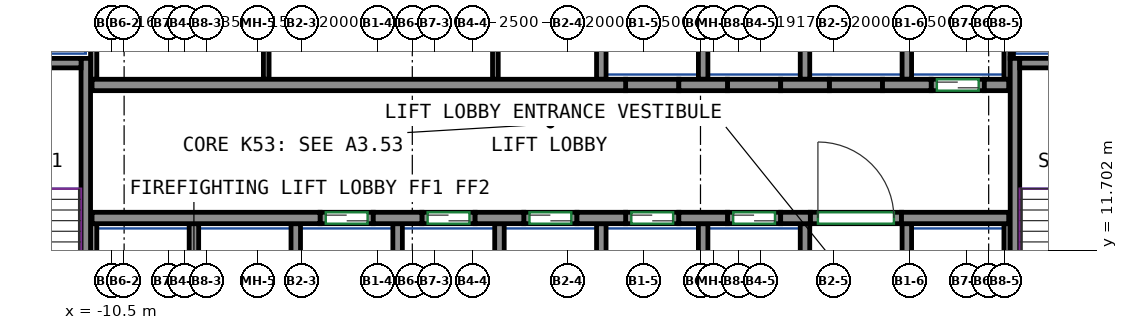
"""IFC4 building model, lengths in metres.
Left out: names, types, materials, properties, quantities, classifications, styles, units other than length and angle.
Written with IfcOpenShell. Run it as: python <this file> out.ifc"""

import sys

from ifc_helpers import new_model, si_unit, direction, frame, frame_2d, origin, place, context, subcontext, project, spatial, rectangle, extrude, source, transform, mapped, element, fill, save


model = new_model("IFC4")
c1 = context("Model", 3, precision=1e-05, world=origin(), true_north=direction((0.0, 1.0)))
c2 = subcontext(c1, "Body", "Model", "MODEL_VIEW")
j1 = project(units=[si_unit("LENGTHUNIT", "METRE"), si_unit("PLANEANGLEUNIT", "RADIAN")], contexts=[c1])
p1 = place(None, origin())
s1 = spatial("IfcSite", under=j1, at=p1, CompositionType="ELEMENT")
p2 = place(p1, origin())
s2 = spatial("IfcBuilding", under=s1, at=p2, CompositionType="ELEMENT")
p3 = place(p2, frame((0.0, 0.0, 213.5)))
s3 = spatial("IfcBuildingStorey", under=s2, at=p3, CompositionType="ELEMENT", Elevation=213.5)
m1 = source(origin(), c2, "Body", "SweptSolid", [
    extrude(rectangle(XDim=7.75, YDim=0.25, at=frame_2d((3.875, 0.0))), origin(), (0.0, 0.0, 1.0), 3.12),
])
p4 = place(p3, frame((-11.175, 9.0, 0.0), z_axis=(0.0, 0.0, 1.0), x_axis=(0.0, 1.0, 0.0)))
e1 = element("IfcWall", 1, at=p4, inside=s3, PredefinedType="SHEAR", context=c2, shape_type="MappedRepresentation", body=[
    mapped(m1, transform((0.0, 0.0, 0.0))),
])
m2 = source(origin(), c2, "Body", "SweptSolid", [
    extrude(rectangle(XDim=3.7, YDim=0.25, at=frame_2d((1.85, 0.0))), origin(), (0.0, 0.0, 1.0), 3.12),
])
p5 = place(p3, frame((-15.0, 16.625, 0.0), z_axis=(0.0, 0.0, 1.0), x_axis=(1.0, 0.0, 0.0)))
e2 = element("IfcWall", 2, at=p5, inside=s3, PredefinedType="SHEAR", context=c2, shape_type="MappedRepresentation", body=[
    mapped(m2, transform((0.0, 0.0, 0.0))),
])
p6 = place(p3, frame((13.275, 9.0, 0.0), z_axis=(0.0, 0.0, 1.0), x_axis=(0.0, 1.0, 0.0)))
e3 = element("IfcWall", 3, at=p6, inside=s3, PredefinedType="SHEAR", context=c2, shape_type="MappedRepresentation", body=[
    mapped(m1, transform((0.0, 0.0, 0.0))),
])
m3 = source(origin(), c2, "Body", "SweptSolid", [
    extrude(rectangle(XDim=3.7, YDim=0.25, at=frame_2d((1.85, 0.0))), origin(), (0.0, 0.0, 1.0), 3.12),
])
p7 = place(p3, frame((13.4, 16.625, 0.0), z_axis=(0.0, 0.0, 1.0), x_axis=(1.0, 0.0, 0.0)))
e4 = element("IfcWall", 4, at=p7, inside=s3, PredefinedType="SHEAR", context=c2, shape_type="MappedRepresentation", body=[
    mapped(m3, transform((0.0, 0.0, 0.0))),
])
m4 = source(origin(), c2, "Body", "SweptSolid", [
    extrude(rectangle(XDim=6.0, YDim=0.3, at=frame_2d((3.0, 0.0))), origin(), (0.0, 0.0, 1.0), 3.12),
])
p8 = place(p3, frame((-11.01, 12.55, 0.0), z_axis=(0.0, 0.0, 1.0), x_axis=(1.0, 0.0, 0.0)))
e5 = element("IfcWall", 5, at=p8, inside=s3, PredefinedType="SHEAR", context=c2, shape_type="MappedRepresentation", body=[
    mapped(m4, transform((0.0, 0.0, 0.0))),
])
m5 = source(origin(), c2, "Body", "SweptSolid", [
    extrude(rectangle(XDim=1.28, YDim=0.3, at=frame_2d((0.64, 0.0))), origin(), (0.0, 0.0, 1.0), 3.12),
])
for number, where, z_axis, x_axis in (
    (6, (-3.61, 12.55, 0.0), (0.0, 0.0, 1.0), (1.0, 0.0, 0.0)),
    (7, (-0.93, 12.55, 0.0), (0.0, 0.0, 1.0), (1.0, 0.0, 0.0)),
    (8, (1.75, 12.55, 0.0), (0.0, 0.0, 1.0), (1.0, 0.0, 0.0)),
    (9, (4.43, 12.55, 0.0), (0.0, 0.0, 1.0), (1.0, 0.0, 0.0)),
):
    element("IfcWall", number, at=place(p3, frame(where, z_axis=z_axis, x_axis=x_axis)), inside=s3, PredefinedType="SHEAR", context=c2, shape_type="MappedRepresentation", body=[
        mapped(m5, transform((0.0, 0.0, 0.0))),
    ])
m6 = source(origin(), c2, "Body", "SweptSolid", [
    extrude(rectangle(XDim=0.78, YDim=0.3, at=frame_2d((0.39, 0.0))), origin(), (0.0, 0.0, 1.0), 3.12),
])
p9 = place(p3, frame((7.11, 12.55, 0.0), z_axis=(0.0, 0.0, 1.0), x_axis=(1.0, 0.0, 0.0)))
e10 = element("IfcWall", 10, at=p9, inside=s3, PredefinedType="SHEAR", context=c2, shape_type="MappedRepresentation", body=[
    mapped(m6, transform((0.0, 0.0, 0.0))),
])
m7 = source(origin(), c2, "Body", "SweptSolid", [
    extrude(rectangle(XDim=2.82, YDim=0.3, at=frame_2d((1.41, 0.0))), origin(), (0.0, 0.0, 1.0), 3.12),
])
p10 = place(p3, frame((10.29, 12.55, 0.0), z_axis=(0.0, 0.0, 1.0), x_axis=(1.0, 0.0, 0.0)))
e11 = element("IfcWall", 11, at=p10, inside=s3, PredefinedType="SHEAR", context=c2, shape_type="MappedRepresentation", body=[
    mapped(m7, transform((0.0, 0.0, 0.0))),
])
m8 = source(origin(), c2, "Body", "SweptSolid", [
    extrude(rectangle(XDim=14.04, YDim=0.3, at=frame_2d((7.02, 0.0))), origin(), (0.0, 0.0, 1.0), 3.12),
])
p11 = place(p3, frame((-11.01, 16.05, 0.0), z_axis=(0.0, 0.0, 1.0), x_axis=(1.0, 0.0, 0.0)))
e12 = element("IfcWall", 12, at=p11, inside=s3, PredefinedType="SHEAR", context=c2, shape_type="MappedRepresentation", body=[
    mapped(m8, transform((0.0, 0.0, 0.0))),
])
p12 = place(p3, frame((4.43, 16.05, 0.0), z_axis=(0.0, 0.0, 1.0), x_axis=(1.0, 0.0, 0.0)))
e13 = element("IfcWall", 13, at=p12, inside=s3, PredefinedType="SHEAR", context=c2, shape_type="MappedRepresentation", body=[
    mapped(m5, transform((0.0, 0.0, 0.0))),
])
m9 = source(origin(), c2, "Body", "SweptSolid", [
    extrude(rectangle(XDim=1.28, YDim=0.3, at=frame_2d((0.64, 0.0))), origin(), (0.0, 0.0, 1.0), 3.12),
])
p13 = place(p3, frame((7.11, 16.05, 0.0), z_axis=(0.0, 0.0, 1.0), x_axis=(1.0, 0.0, 0.0)))
e14 = element("IfcWall", 14, at=p13, inside=s3, PredefinedType="SHEAR", context=c2, shape_type="MappedRepresentation", body=[
    mapped(m9, transform((0.0, 0.0, 0.0))),
])
p14 = place(p3, frame((9.79, 16.05, 0.0), z_axis=(0.0, 0.0, 1.0), x_axis=(1.0, 0.0, 0.0)))
e15 = element("IfcWall", 15, at=p14, inside=s3, PredefinedType="SHEAR", context=c2, shape_type="MappedRepresentation", body=[
    mapped(m5, transform((0.0, 0.0, 0.0))),
])
m10 = source(origin(), c2, "Body", "SweptSolid", [
    extrude(rectangle(XDim=0.64, YDim=0.3, at=frame_2d((0.32, 0.0))), origin(), (0.0, 0.0, 1.0), 3.12),
])
p15 = place(p3, frame((12.47, 16.05, 0.0), z_axis=(0.0, 0.0, 1.0), x_axis=(1.0, 0.0, 0.0)))
e16 = element("IfcWall", 16, at=p15, inside=s3, PredefinedType="SHEAR", context=c2, shape_type="MappedRepresentation", body=[
    mapped(m10, transform((0.0, 0.0, 0.0))),
])
m11 = source(origin(), c2, "Body", "SweptSolid", [
    extrude(rectangle(XDim=1.4, YDim=0.3, at=frame_2d((0.7, 0.0))), origin(), (0.0, 0.0, 1.0), 3.12),
])
p16 = place(p3, frame((-5.01, 12.55, 0.0), z_axis=(0.0, 0.0, 1.0), x_axis=(1.0, 0.0, 0.0)))
e17 = element("IfcWall", 17, at=p16, inside=s3, PredefinedType="PARTITIONING", context=c2, shape_type="MappedRepresentation", body=[
    mapped(m11, transform((0.0, 0.0, 0.0))),
])
p17 = place(p16, frame((0.15, 0.0, 0.0)))
e18 = element("IfcOpeningElement", 18, at=p17, cuts=e17, PredefinedType="OPENING", context=c2, shape_type="SweptSolid", body=[
    extrude(rectangle(XDim=1.1, YDim=2.1, at=frame_2d((0.55, 1.05))), frame((0.0, 0.16, 0.0), z_axis=(0.0, -1.0, 0.0), x_axis=(1.0, 0.0, 0.0)), (0.0, 0.0, 1.0), 0.32),
])
m12 = source(origin(), c2, "Body", "SweptSolid", [
    extrude(rectangle(XDim=1.4, YDim=0.3, at=frame_2d((0.7, 0.0))), origin(), (0.0, 0.0, 1.0), 3.12),
])
p18 = place(p3, frame((-2.33, 12.55, 0.0), z_axis=(0.0, 0.0, 1.0), x_axis=(1.0, 0.0, 0.0)))
e19 = element("IfcWall", 19, at=p18, inside=s3, PredefinedType="PARTITIONING", context=c2, shape_type="MappedRepresentation", body=[
    mapped(m12, transform((0.0, 0.0, 0.0))),
])
p19 = place(p18, frame((0.15, 0.0, 0.0)))
e20 = element("IfcOpeningElement", 20, at=p19, cuts=e19, PredefinedType="OPENING", context=c2, shape_type="SweptSolid", body=[
    extrude(rectangle(XDim=1.1, YDim=2.1, at=frame_2d((0.55, 1.05))), frame((0.0, 0.16, 0.0), z_axis=(0.0, -1.0, 0.0), x_axis=(1.0, 0.0, 0.0)), (0.0, 0.0, 1.0), 0.32),
])
p20 = place(p3, frame((0.35, 12.55, 0.0), z_axis=(0.0, 0.0, 1.0), x_axis=(1.0, 0.0, 0.0)))
e21 = element("IfcWall", 21, at=p20, inside=s3, PredefinedType="PARTITIONING", context=c2, shape_type="MappedRepresentation", body=[
    mapped(m11, transform((0.0, 0.0, 0.0))),
])
p21 = place(p20, frame((0.15, 0.0, 0.0)))
e22 = element("IfcOpeningElement", 22, at=p21, cuts=e21, PredefinedType="OPENING", context=c2, shape_type="SweptSolid", body=[
    extrude(rectangle(XDim=1.1, YDim=2.1, at=frame_2d((0.55, 1.05))), frame((0.0, 0.16, 0.0), z_axis=(0.0, -1.0, 0.0), x_axis=(1.0, 0.0, 0.0)), (0.0, 0.0, 1.0), 0.32),
])
p22 = place(p3, frame((3.03, 12.55, 0.0), z_axis=(0.0, 0.0, 1.0), x_axis=(1.0, 0.0, 0.0)))
e23 = element("IfcWall", 23, at=p22, inside=s3, PredefinedType="PARTITIONING", context=c2, shape_type="MappedRepresentation", body=[
    mapped(m11, transform((0.0, 0.0, 0.0))),
])
p23 = place(p22, frame((0.15, 0.0, 0.0)))
e24 = element("IfcOpeningElement", 24, at=p23, cuts=e23, PredefinedType="OPENING", context=c2, shape_type="SweptSolid", body=[
    extrude(rectangle(XDim=1.1, YDim=2.1, at=frame_2d((0.55, 1.05))), frame((0.0, 0.16, 0.0), z_axis=(0.0, -1.0, 0.0), x_axis=(1.0, 0.0, 0.0)), (0.0, 0.0, 1.0), 0.32),
])
p24 = place(p3, frame((5.71, 12.55, 0.0), z_axis=(0.0, 0.0, 1.0), x_axis=(1.0, 0.0, 0.0)))
e25 = element("IfcWall", 25, at=p24, inside=s3, PredefinedType="PARTITIONING", context=c2, shape_type="MappedRepresentation", body=[
    mapped(m12, transform((0.0, 0.0, 0.0))),
])
p25 = place(p24, frame((0.15, 0.0, 0.0)))
e26 = element("IfcOpeningElement", 26, at=p25, cuts=e25, PredefinedType="OPENING", context=c2, shape_type="SweptSolid", body=[
    extrude(rectangle(XDim=1.1, YDim=2.1, at=frame_2d((0.55, 1.05))), frame((0.0, 0.16, 0.0), z_axis=(0.0, -1.0, 0.0), x_axis=(1.0, 0.0, 0.0)), (0.0, 0.0, 1.0), 0.32),
])
p26 = place(p3, frame((11.07, 16.05, 0.0), z_axis=(0.0, 0.0, 1.0), x_axis=(1.0, 0.0, 0.0)))
e27 = element("IfcWall", 27, at=p26, inside=s3, PredefinedType="PARTITIONING", context=c2, shape_type="MappedRepresentation", body=[
    mapped(m11, transform((0.0, 0.0, 0.0))),
])
p27 = place(p26, frame((0.15, 0.0, 0.0)))
e28 = element("IfcOpeningElement", 28, at=p27, cuts=e27, PredefinedType="OPENING", context=c2, shape_type="SweptSolid", body=[
    extrude(rectangle(XDim=1.1, YDim=2.1, at=frame_2d((0.55, 1.05))), frame((0.0, 0.16, 0.0), z_axis=(0.0, -1.0, 0.0), x_axis=(1.0, 0.0, 0.0)), (0.0, 0.0, 1.0), 0.32),
])
m13 = source(origin(), c2, "Body", "SweptSolid", [
    extrude(rectangle(XDim=2.4, YDim=0.3, at=frame_2d((1.2, 0.0))), origin(), (0.0, 0.0, 1.0), 3.12),
])
p28 = place(p3, frame((7.89, 12.55, 0.0), z_axis=(0.0, 0.0, 1.0), x_axis=(1.0, 0.0, 0.0)))
e29 = element("IfcWall", 29, at=p28, inside=s3, PredefinedType="PARTITIONING", context=c2, shape_type="MappedRepresentation", body=[
    mapped(m13, transform((0.0, 0.0, 0.0))),
])
p29 = place(p28, frame((0.2, 0.0, 0.0)))
e30 = element("IfcOpeningElement", 30, at=p29, cuts=e29, PredefinedType="OPENING", context=c2, shape_type="SweptSolid", body=[
    extrude(rectangle(XDim=2.0, YDim=2.1, at=frame_2d((1.0, 1.05))), frame((0.0, 0.16, 0.0), z_axis=(0.0, -1.0, 0.0), x_axis=(1.0, 0.0, 0.0)), (0.0, 0.0, 1.0), 0.32),
])
p30 = place(p3, frame((3.03, 16.05, 0.0), z_axis=(0.0, 0.0, 1.0), x_axis=(1.0, 0.0, 0.0)))
e31 = element("IfcWall", 31, at=p30, inside=s3, PredefinedType="PARTITIONING", context=c2, shape_type="MappedRepresentation", body=[
    mapped(m11, transform((0.0, 0.0, 0.0))),
])
for number, where, z_axis, x_axis in (
    (32, (5.71, 16.05, 0.0), (0.0, 0.0, 1.0), (1.0, 0.0, 0.0)),
    (33, (8.39, 16.05, 0.0), (0.0, 0.0, 1.0), (1.0, 0.0, 0.0)),
):
    element("IfcWall", number, at=place(p3, frame(where, z_axis=z_axis, x_axis=x_axis)), inside=s3, PredefinedType="PARTITIONING", context=c2, shape_type="MappedRepresentation", body=[
        mapped(m12, transform((0.0, 0.0, 0.0))),
    ])
m14 = source(origin(), c2, "Body", "SweptSolid", [
    extrude(rectangle(XDim=3.275, YDim=0.165, at=frame_2d((1.638, 0.0))), origin(), (0.0, 0.0, 1.0), 3.12),
])
p31 = place(p3, frame((13.067, 16.2, 0.0), z_axis=(0.0, 0.0, 1.0), x_axis=(0.0, 1.0, 0.0)))
e34 = element("IfcWall", 34, at=p31, inside=s3, PredefinedType="PARTITIONING", context=c2, shape_type="MappedRepresentation", body=[
    mapped(m14, transform((0.0, 0.0, 0.0))),
])
m15 = source(origin(), c2, "Body", "SweptSolid", [
    extrude(rectangle(XDim=4.8, YDim=0.165, at=frame_2d((2.4, 0.0))), origin(), (0.0, 0.0, 1.0), 3.12),
])
p32 = place(p3, frame((-10.968, 16.2, 0.0), z_axis=(0.0, 0.0, 1.0), x_axis=(0.0, 1.0, 0.0)))
e35 = element("IfcWall", 35, at=p32, inside=s3, PredefinedType="PARTITIONING", context=c2, shape_type="MappedRepresentation", body=[
    mapped(m15, transform((0.0, 0.0, 0.0))),
])
m16 = source(origin(), c2, "Body", "SweptSolid", [
    extrude(rectangle(XDim=3.275, YDim=0.25, at=frame_2d((1.638, 0.0))), origin(), (0.0, 0.0, 1.0), 3.12),
])
p33 = place(p3, frame((10.43, 16.2, 0.0), z_axis=(0.0, 0.0, 1.0), x_axis=(0.0, 1.0, 0.0)))
e36 = element("IfcWall", 36, at=p33, inside=s3, PredefinedType="PARTITIONING", context=c2, shape_type="MappedRepresentation", body=[
    mapped(m16, transform((0.0, 0.0, 0.0))),
])
m17 = source(origin(), c2, "Body", "SweptSolid", [
    extrude(rectangle(XDim=2.725, YDim=0.085, at=frame_2d((1.363, 0.0))), origin(), (0.0, 0.0, 1.0), 3.12),
])
p34 = place(p3, frame((13.192, 16.75, 0.0), z_axis=(0.0, 0.0, 1.0), x_axis=(0.0, 1.0, 0.0)))
e37 = element("IfcWall", 37, at=p34, inside=s3, PredefinedType="PARTITIONING", context=c2, shape_type="MappedRepresentation", body=[
    mapped(m17, transform((0.0, 0.0, 0.0))),
])
for number, where, z_axis, x_axis in (
    (38, (2.39, 16.2, 0.0), (0.0, 0.0, 1.0), (0.0, 1.0, 0.0)),
    (39, (5.07, 16.2, 0.0), (0.0, 0.0, 1.0), (0.0, 1.0, 0.0)),
    (40, (7.75, 16.2, 0.0), (0.0, 0.0, 1.0), (0.0, 1.0, 0.0)),
):
    element("IfcWall", number, at=place(p3, frame(where, z_axis=z_axis, x_axis=x_axis)), inside=s3, PredefinedType="PARTITIONING", context=c2, shape_type="MappedRepresentation", body=[
        mapped(m16, transform((0.0, 0.0, 0.0))),
    ])
m18 = source(origin(), c2, "Body", "SweptSolid", [
    extrude(rectangle(XDim=3.4, YDim=0.25, at=frame_2d((1.7, 0.0))), origin(), (0.0, 0.0, 1.0), 3.12),
])
p35 = place(p3, frame((10.43, 9.0, 0.0), z_axis=(0.0, 0.0, 1.0), x_axis=(0.0, 1.0, 0.0)))
e41 = element("IfcWall", 41, at=p35, inside=s3, PredefinedType="PARTITIONING", context=c2, shape_type="MappedRepresentation", body=[
    mapped(m18, transform((0.0, 0.0, 0.0))),
])
m19 = source(origin(), c2, "Body", "SweptSolid", [
    extrude(rectangle(XDim=3.4, YDim=0.165, at=frame_2d((1.7, 0.0))), origin(), (0.0, 0.0, 1.0), 3.12),
])
p36 = place(p3, frame((13.067, 9.0, 0.0), z_axis=(0.0, 0.0, 1.0), x_axis=(0.0, 1.0, 0.0)))
e42 = element("IfcWall", 42, at=p36, inside=s3, PredefinedType="PARTITIONING", context=c2, shape_type="MappedRepresentation", body=[
    mapped(m19, transform((0.0, 0.0, 0.0))),
])
for number, where, z_axis, x_axis in (
    (43, (2.39, 9.0, 0.0), (0.0, 0.0, 1.0), (0.0, 1.0, 0.0)),
    (44, (5.07, 9.0, 0.0), (0.0, 0.0, 1.0), (0.0, 1.0, 0.0)),
    (45, (7.75, 9.0, 0.0), (0.0, 0.0, 1.0), (0.0, 1.0, 0.0)),
    (46, (-0.29, 9.0, 0.0), (0.0, 0.0, 1.0), (0.0, 1.0, 0.0)),
):
    element("IfcWall", number, at=place(p3, frame(where, z_axis=z_axis, x_axis=x_axis)), inside=s3, PredefinedType="PARTITIONING", context=c2, shape_type="MappedRepresentation", body=[
        mapped(m18, transform((0.0, 0.0, 0.0))),
    ])
p37 = place(p3, frame((-10.968, 9.0, 0.0), z_axis=(0.0, 0.0, 1.0), x_axis=(0.0, 1.0, 0.0)))
e47 = element("IfcWall", 47, at=p37, inside=s3, PredefinedType="PARTITIONING", context=c2, shape_type="MappedRepresentation", body=[
    mapped(m19, transform((0.0, 0.0, 0.0))),
])
for number, where, z_axis, x_axis in (
    (48, (-2.97, 9.0, 0.0), (0.0, 0.0, 1.0), (0.0, 1.0, 0.0)),
    (49, (-5.65, 9.0, 0.0), (0.0, 0.0, 1.0), (0.0, 1.0, 0.0)),
    (50, (-8.33, 9.0, 0.0), (0.0, 0.0, 1.0), (0.0, 1.0, 0.0)),
):
    element("IfcWall", number, at=place(p3, frame(where, z_axis=z_axis, x_axis=x_axis)), inside=s3, PredefinedType="PARTITIONING", context=c2, shape_type="MappedRepresentation", body=[
        mapped(m18, transform((0.0, 0.0, 0.0))),
    ])
m20 = source(origin(), c2, "Body", "SweptSolid", [
    extrude(rectangle(XDim=4.8, YDim=0.15, at=frame_2d((2.4, 0.0))), origin(), (0.0, 0.0, 1.0), 3.12),
])
for number, where, z_axis, x_axis in (
    (51, (-6.427, 16.2, 0.0), (0.0, 0.0, 1.0), (0.0, 1.0, 0.0)),
    (52, (-0.397, 16.2, 0.0), (0.0, 0.0, 1.0), (0.0, 1.0, 0.0)),
):
    element("IfcWall", number, at=place(p3, frame(where, z_axis=z_axis, x_axis=x_axis)), inside=s3, PredefinedType="PARTITIONING", context=c2, shape_type="MappedRepresentation", body=[
        mapped(m20, transform((0.0, 0.0, 0.0))),
    ])
p38 = place(p29, origin())
e53 = element("IfcDoor", 53, at=p38, inside=s3, OperationType="DOUBLE_DOOR_SINGLE_SWING", PredefinedType="DOOR", context=c2, shape_type="SweptSolid", body=[
    extrude(rectangle(XDim=2.0, YDim=2.1, at=frame_2d((1.0, 1.05))), frame((0.0, 0.025, 0.0), z_axis=(0.0, -1.0, 0.0), x_axis=(1.0, 0.0, 0.0)), (0.0, 0.0, 1.0), 0.05),
])
fill(e30, e53)
p39 = place(p17, origin())
e54 = element("IfcDoor", 54, at=p39, inside=s3, OperationType="DOUBLE_DOOR_SLIDING", PredefinedType="DOOR", context=c2, shape_type="SweptSolid", body=[
    extrude(rectangle(XDim=1.1, YDim=2.1, at=frame_2d((0.55, 1.05))), frame((0.0, 0.025, 0.0), z_axis=(0.0, -1.0, 0.0), x_axis=(1.0, 0.0, 0.0)), (0.0, 0.0, 1.0), 0.05),
])
fill(e18, e54)
p40 = place(p19, origin())
e55 = element("IfcDoor", 55, at=p40, inside=s3, OperationType="DOUBLE_DOOR_SLIDING", PredefinedType="DOOR", context=c2, shape_type="SweptSolid", body=[
    extrude(rectangle(XDim=1.1, YDim=2.1, at=frame_2d((0.55, 1.05))), frame((0.0, 0.025, 0.0), z_axis=(0.0, -1.0, 0.0), x_axis=(1.0, 0.0, 0.0)), (0.0, 0.0, 1.0), 0.05),
])
fill(e20, e55)
p41 = place(p21, origin())
e56 = element("IfcDoor", 56, at=p41, inside=s3, OperationType="DOUBLE_DOOR_SLIDING", PredefinedType="DOOR", context=c2, shape_type="SweptSolid", body=[
    extrude(rectangle(XDim=1.1, YDim=2.1, at=frame_2d((0.55, 1.05))), frame((0.0, 0.025, 0.0), z_axis=(0.0, -1.0, 0.0), x_axis=(1.0, 0.0, 0.0)), (0.0, 0.0, 1.0), 0.05),
])
fill(e22, e56)
p42 = place(p23, origin())
e57 = element("IfcDoor", 57, at=p42, inside=s3, OperationType="DOUBLE_DOOR_SLIDING", PredefinedType="DOOR", context=c2, shape_type="SweptSolid", body=[
    extrude(rectangle(XDim=1.1, YDim=2.1, at=frame_2d((0.55, 1.05))), frame((0.0, 0.025, 0.0), z_axis=(0.0, -1.0, 0.0), x_axis=(1.0, 0.0, 0.0)), (0.0, 0.0, 1.0), 0.05),
])
fill(e24, e57)
p43 = place(p25, origin())
e58 = element("IfcDoor", 58, at=p43, inside=s3, OperationType="DOUBLE_DOOR_SLIDING", PredefinedType="DOOR", context=c2, shape_type="SweptSolid", body=[
    extrude(rectangle(XDim=1.1, YDim=2.1, at=frame_2d((0.55, 1.05))), frame((0.0, 0.025, 0.0), z_axis=(0.0, -1.0, 0.0), x_axis=(1.0, 0.0, 0.0)), (0.0, 0.0, 1.0), 0.05),
])
fill(e26, e58)
p44 = place(p27, origin())
e59 = element("IfcDoor", 59, at=p44, inside=s3, OperationType="DOUBLE_DOOR_SLIDING", PredefinedType="DOOR", context=c2, shape_type="SweptSolid", body=[
    extrude(rectangle(XDim=1.1, YDim=2.1, at=frame_2d((0.55, 1.05))), frame((0.0, 0.025, 0.0), z_axis=(0.0, -1.0, 0.0), x_axis=(1.0, 0.0, 0.0)), (0.0, 0.0, 1.0), 0.05),
])
fill(e28, e59)
save(model, sys.argv[1])
